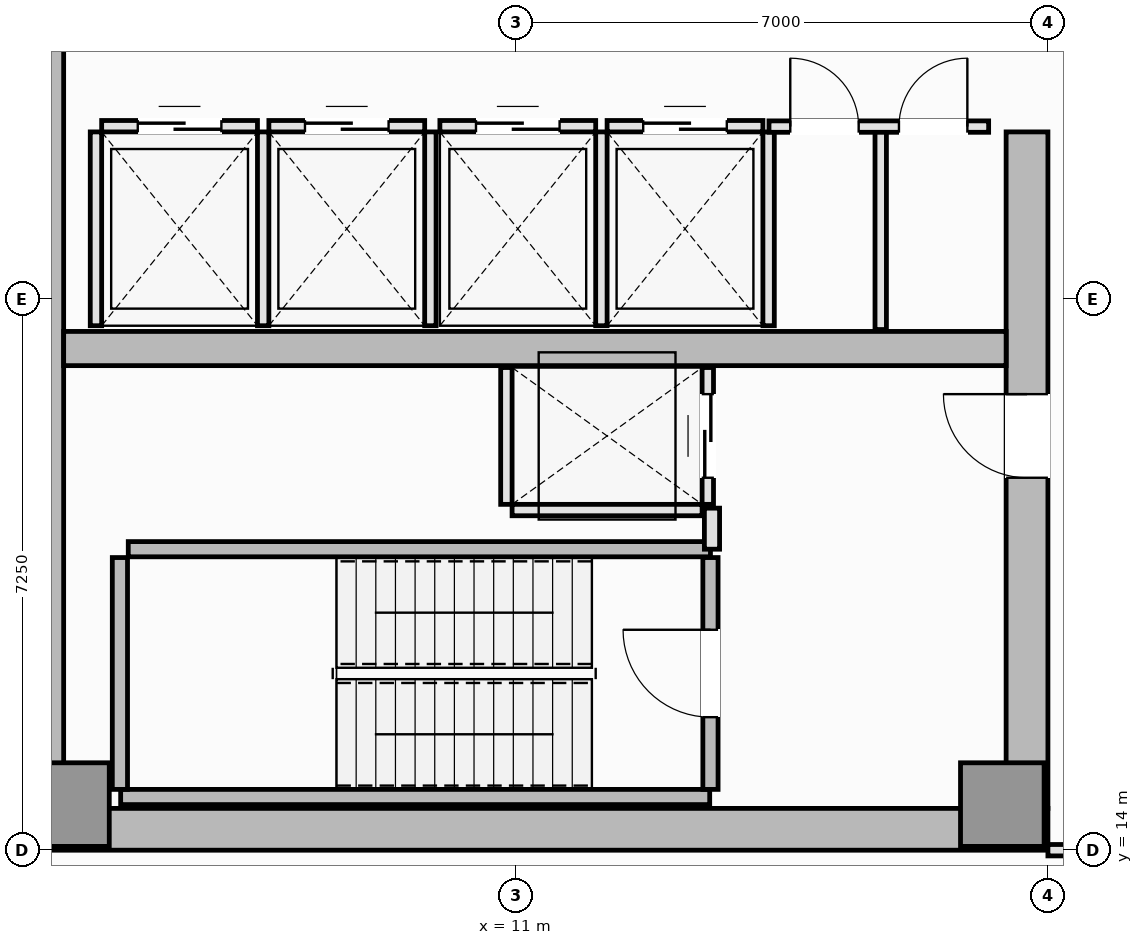
"""IFC4 building model, lengths in metres.
Left out: names, types, materials, properties, quantities, classifications, styles, units other than length and angle.
Written with IfcOpenShell. Run it as: python <this file> out.ifc"""

import sys

from ifc_helpers import new_model, si_unit, direction, frame, frame_2d, origin, origin_2d, place, context, subcontext, project, spatial, rectangle, extrude, element, fill, save


model = new_model("IFC4")
c1 = context("Model", 3, precision=1e-05, world=origin(), true_north=direction((0.0, 1.0)))
c2 = subcontext(c1, "Body", "Model", "MODEL_VIEW")
j1 = project(units=[si_unit("LENGTHUNIT", "METRE"), si_unit("PLANEANGLEUNIT", "RADIAN")], contexts=[c1])
p1 = place(None, origin())
s1 = spatial("IfcSite", under=j1, at=p1, CompositionType="ELEMENT")
p2 = place(p1, origin())
s2 = spatial("IfcBuilding", under=s1, at=p2, CompositionType="ELEMENT")
p3 = place(p2, frame((0.0, 0.0, 183.65)))
s3 = spatial("IfcBuildingStorey", under=s2, at=p3, CompositionType="ELEMENT", Elevation=183.65)
p4 = place(p3, frame((4.5, 14.275, 0.0), z_axis=(0.0, 0.0, 1.0), x_axis=(1.0, 0.0, 0.0)))
e1 = element("IfcWall", 1, at=p4, inside=s3, PredefinedType="SHEAR", context=c2, shape_type="SweptSolid", body=[
    extrude(rectangle(XDim=13.5, YDim=0.55, at=frame_2d((6.75, 0.0))), origin(), (0.0, 0.0, 1.0), 4.4),
])
p5 = place(p3, frame((4.775, 14.55, 0.0), z_axis=(0.0, 0.0, 1.0), x_axis=(0.0, 1.0, 0.0)))
e2 = element("IfcWall", 2, at=p5, inside=s3, PredefinedType="SHEAR", context=c2, shape_type="SweptSolid", body=[
    extrude(rectangle(XDim=21.4, YDim=0.55, at=frame_2d((10.7, 0.0))), origin(), (0.0, 0.0, 1.0), 4.4),
])
p6 = place(p3, frame((17.725, 14.55, 0.0), z_axis=(0.0, 0.0, 1.0), x_axis=(0.0, 1.0, 0.0)))
e3 = element("IfcWall", 3, at=p6, inside=s3, PredefinedType="SHEAR", context=c2, shape_type="SweptSolid", body=[
    extrude(rectangle(XDim=8.9, YDim=0.55, at=frame_2d((4.45, 0.0))), origin(), (0.0, 0.0, 1.0), 4.4),
])
p7 = place(p6, frame((4.35, 0.0, 0.0)))
e4 = element("IfcOpeningElement", 4, at=p7, cuts=e3, PredefinedType="OPENING", context=c2, shape_type="SweptSolid", body=[
    extrude(rectangle(XDim=1.1, YDim=2.15, at=frame_2d((0.55, 1.075))), frame((0.0, 0.285, 0.0), z_axis=(0.0, -1.0, 0.0), x_axis=(1.0, 0.0, 0.0)), (0.0, 0.0, 1.0), 0.57),
])
p8 = place(p3, frame((5.05, 20.6, 0.0), z_axis=(0.0, 0.0, 1.0), x_axis=(1.0, 0.0, 0.0)))
e5 = element("IfcWall", 5, at=p8, inside=s3, PredefinedType="SHEAR", context=c2, shape_type="SweptSolid", body=[
    extrude(rectangle(XDim=12.4, YDim=0.45, at=frame_2d((6.2, 0.0))), origin(), (0.0, 0.0, 1.0), 4.4),
])
for number, where, z_axis, x_axis in (
    (6, (5.1, 14.6, 0.0), (0.0, 0.0, 1.0), (1.0, 0.0, 0.0)),
    (7, (17.4, 14.6, 0.0), (0.0, 0.0, 1.0), (1.0, 0.0, 0.0)),
):
    element("IfcColumn", number, at=place(p3, frame(where, z_axis=z_axis, x_axis=x_axis)), inside=s3, PredefinedType="PILASTER", context=c2, shape_type="SweptSolid", body=[
        extrude(rectangle(XDim=1.1, YDim=1.1, at=origin_2d()), origin(), (0.0, 0.0, 1.0), 4.4),
    ])
p9 = place(p3, frame((5.8, 14.7, 0.0), z_axis=(0.0, 0.0, 1.0), x_axis=(1.0, 0.0, 0.0)))
e8 = element("IfcWall", 8, at=p9, inside=s3, PredefinedType="SOLIDWALL", context=c2, shape_type="SweptSolid", body=[
    extrude(rectangle(XDim=7.75, YDim=0.2, at=frame_2d((3.875, 0.0))), origin(), (0.0, 0.0, 1.0), 4.4),
])
p10 = place(p3, frame((5.79, 14.8, 0.0), z_axis=(0.0, 0.0, 1.0), x_axis=(0.0, 1.0, 0.0)))
e9 = element("IfcWall", 9, at=p10, inside=s3, PredefinedType="SOLIDWALL", context=c2, shape_type="SweptSolid", body=[
    extrude(rectangle(XDim=3.05, YDim=0.2, at=frame_2d((1.525, 0.0))), origin(), (0.0, 0.0, 1.0), 4.4),
])
p11 = place(p3, frame((5.9, 17.96, 0.0), z_axis=(0.0, 0.0, 1.0), x_axis=(1.0, 0.0, 0.0)))
e10 = element("IfcWall", 10, at=p11, inside=s3, PredefinedType="SOLIDWALL", context=c2, shape_type="SweptSolid", body=[
    extrude(rectangle(XDim=7.66, YDim=0.2, at=frame_2d((3.83, 0.0))), origin(), (0.0, 0.0, 1.0), 4.4),
])
p12 = place(p3, frame((13.56, 14.8, 0.0), z_axis=(0.0, 0.0, 1.0), x_axis=(0.0, 1.0, 0.0)))
e11 = element("IfcWall", 11, at=p12, inside=s3, PredefinedType="SOLIDWALL", context=c2, shape_type="SweptSolid", body=[
    extrude(rectangle(XDim=3.05, YDim=0.2, at=frame_2d((1.525, 0.0))), origin(), (0.0, 0.0, 1.0), 4.4),
])
p13 = place(p12, frame((0.95, 0.0, 0.0)))
e12 = element("IfcOpeningElement", 12, at=p13, cuts=e11, PredefinedType="OPENING", context=c2, shape_type="SweptSolid", body=[
    extrude(rectangle(XDim=1.15, YDim=2.15, at=frame_2d((0.575, 1.075))), frame((0.0, 0.11, 0.0), z_axis=(0.0, -1.0, 0.0), x_axis=(1.0, 0.0, 0.0)), (0.0, 0.0, 1.0), 0.22),
])
p14 = place(p3, frame((5.55, 23.525, 0.0), z_axis=(0.0, 0.0, 1.0), x_axis=(1.0, 0.0, 0.0)))
e13 = element("IfcWall", 13, at=p14, inside=s3, PredefinedType="PARTITIONING", context=c2, shape_type="SweptSolid", body=[
    extrude(rectangle(XDim=2.05, YDim=0.15, at=frame_2d((1.025, 0.0))), origin(), (0.0, 0.0, 1.0), 4.22),
])
p15 = place(p14, frame((0.475, 0.0, 0.0)))
e14 = element("IfcOpeningElement", 14, at=p15, cuts=e13, PredefinedType="OPENING", context=c2, shape_type="SweptSolid", body=[
    extrude(rectangle(XDim=1.1, YDim=2.2, at=frame_2d((0.55, 1.1))), frame((0.0, 0.085, 0.0), z_axis=(0.0, -1.0, 0.0), x_axis=(1.0, 0.0, 0.0)), (0.0, 0.0, 1.0), 0.17),
])
for number, where, z_axis, x_axis in (
    (15, (5.475, 20.9, 0.0), (0.0, 0.0, 1.0), (0.0, 1.0, 0.0)),
    (16, (7.675, 20.9, 0.0), (0.0, 0.0, 1.0), (0.0, 1.0, 0.0)),
):
    element("IfcWall", number, at=place(p3, frame(where, z_axis=z_axis, x_axis=x_axis)), inside=s3, PredefinedType="PARTITIONING", context=c2, shape_type="SweptSolid", body=[
        extrude(rectangle(XDim=2.55, YDim=0.15, at=frame_2d((1.275, 0.0))), origin(), (0.0, 0.0, 1.0), 4.22),
    ])
p16 = place(p3, frame((7.75, 23.525, 0.0), z_axis=(0.0, 0.0, 1.0), x_axis=(1.0, 0.0, 0.0)))
e17 = element("IfcWall", 17, at=p16, inside=s3, PredefinedType="PARTITIONING", context=c2, shape_type="SweptSolid", body=[
    extrude(rectangle(XDim=2.05, YDim=0.15, at=frame_2d((1.025, 0.0))), origin(), (0.0, 0.0, 1.0), 4.22),
])
p17 = place(p16, frame((0.475, 0.0, 0.0)))
e18 = element("IfcOpeningElement", 18, at=p17, cuts=e17, PredefinedType="OPENING", context=c2, shape_type="SweptSolid", body=[
    extrude(rectangle(XDim=1.1, YDim=2.2, at=frame_2d((0.55, 1.1))), frame((0.0, 0.085, 0.0), z_axis=(0.0, -1.0, 0.0), x_axis=(1.0, 0.0, 0.0)), (0.0, 0.0, 1.0), 0.17),
])
p18 = place(p3, frame((9.875, 20.9, 0.0), z_axis=(0.0, 0.0, 1.0), x_axis=(0.0, 1.0, 0.0)))
e19 = element("IfcWall", 19, at=p18, inside=s3, PredefinedType="PARTITIONING", context=c2, shape_type="SweptSolid", body=[
    extrude(rectangle(XDim=2.55, YDim=0.15, at=frame_2d((1.275, 0.0))), origin(), (0.0, 0.0, 1.0), 4.22),
])
p19 = place(p3, frame((10.0, 23.525, 0.0), z_axis=(0.0, 0.0, 1.0), x_axis=(1.0, 0.0, 0.0)))
e20 = element("IfcWall", 20, at=p19, inside=s3, PredefinedType="PARTITIONING", context=c2, shape_type="SweptSolid", body=[
    extrude(rectangle(XDim=2.05, YDim=0.15, at=frame_2d((1.025, 0.0))), origin(), (0.0, 0.0, 1.0), 4.22),
])
p20 = place(p19, frame((0.475, 0.0, 0.0)))
e21 = element("IfcOpeningElement", 21, at=p20, cuts=e20, PredefinedType="OPENING", context=c2, shape_type="SweptSolid", body=[
    extrude(rectangle(XDim=1.1, YDim=2.2, at=frame_2d((0.55, 1.1))), frame((0.0, 0.085, 0.0), z_axis=(0.0, -1.0, 0.0), x_axis=(1.0, 0.0, 0.0)), (0.0, 0.0, 1.0), 0.17),
])
p21 = place(p3, frame((12.125, 20.9, 0.0), z_axis=(0.0, 0.0, 1.0), x_axis=(0.0, 1.0, 0.0)))
e22 = element("IfcWall", 22, at=p21, inside=s3, PredefinedType="PARTITIONING", context=c2, shape_type="SweptSolid", body=[
    extrude(rectangle(XDim=2.55, YDim=0.15, at=frame_2d((1.275, 0.0))), origin(), (0.0, 0.0, 1.0), 4.22),
])
p22 = place(p3, frame((12.2, 23.525, 0.0), z_axis=(0.0, 0.0, 1.0), x_axis=(1.0, 0.0, 0.0)))
e23 = element("IfcWall", 23, at=p22, inside=s3, PredefinedType="PARTITIONING", context=c2, shape_type="SweptSolid", body=[
    extrude(rectangle(XDim=2.05, YDim=0.15, at=frame_2d((1.025, 0.0))), origin(), (0.0, 0.0, 1.0), 4.22),
])
p23 = place(p22, frame((0.475, 0.0, 0.0)))
e24 = element("IfcOpeningElement", 24, at=p23, cuts=e23, PredefinedType="OPENING", context=c2, shape_type="SweptSolid", body=[
    extrude(rectangle(XDim=1.1, YDim=2.2, at=frame_2d((0.55, 1.1))), frame((0.0, 0.085, 0.0), z_axis=(0.0, -1.0, 0.0), x_axis=(1.0, 0.0, 0.0)), (0.0, 0.0, 1.0), 0.17),
])
p24 = place(p3, frame((14.325, 20.9, 0.0), z_axis=(0.0, 0.0, 1.0), x_axis=(0.0, 1.0, 0.0)))
e25 = element("IfcWall", 25, at=p24, inside=s3, PredefinedType="PARTITIONING", context=c2, shape_type="SweptSolid", body=[
    extrude(rectangle(XDim=2.55, YDim=0.15, at=frame_2d((1.275, 0.0))), origin(), (0.0, 0.0, 1.0), 4.22),
])
p25 = place(p3, frame((10.95, 18.475, 0.0), z_axis=(0.0, 0.0, 1.0), x_axis=(1.0, 0.0, 0.0)))
e26 = element("IfcWall", 26, at=p25, inside=s3, PredefinedType="PARTITIONING", context=c2, shape_type="SweptSolid", body=[
    extrude(rectangle(XDim=2.5, YDim=0.15, at=frame_2d((1.25, 0.0))), origin(), (0.0, 0.0, 1.0), 4.22),
])
p26 = place(p3, frame((10.875, 18.55, 0.0), z_axis=(0.0, 0.0, 1.0), x_axis=(0.0, 1.0, 0.0)))
e27 = element("IfcWall", 27, at=p26, inside=s3, PredefinedType="PARTITIONING", context=c2, shape_type="SweptSolid", body=[
    extrude(rectangle(XDim=1.8, YDim=0.15, at=frame_2d((0.9, 0.0))), origin(), (0.0, 0.0, 1.0), 4.22),
])
p27 = place(p3, frame((13.525, 18.55, 0.0), z_axis=(0.0, 0.0, 1.0), x_axis=(0.0, 1.0, 0.0)))
e28 = element("IfcWall", 28, at=p27, inside=s3, PredefinedType="PARTITIONING", context=c2, shape_type="SweptSolid", body=[
    extrude(rectangle(XDim=1.8, YDim=0.15, at=frame_2d((0.9, 0.0))), origin(), (0.0, 0.0, 1.0), 4.22),
])
p28 = place(p27, frame((0.35, 0.0, 0.0)))
e29 = element("IfcOpeningElement", 29, at=p28, cuts=e28, PredefinedType="OPENING", context=c2, shape_type="SweptSolid", body=[
    extrude(rectangle(XDim=1.1, YDim=2.2, at=frame_2d((0.55, 1.1))), frame((0.0, 0.085, 0.0), z_axis=(0.0, -1.0, 0.0), x_axis=(1.0, 0.0, 0.0)), (0.0, 0.0, 1.0), 0.17),
])
p29 = place(p3, frame((13.58, 17.96, 0.0), z_axis=(0.0, 0.0, 1.0), x_axis=(0.0, 1.0, 0.0)))
e30 = element("IfcWall", 30, at=p29, inside=s3, PredefinedType="PARTITIONING", context=c2, shape_type="SweptSolid", body=[
    extrude(rectangle(XDim=0.54, YDim=0.2, at=frame_2d((0.27, 0.0))), origin(), (0.0, 0.0, 1.0), 4.22),
])
p30 = place(p3, frame((15.8, 20.85, 0.0), z_axis=(0.0, 0.0, 1.0), x_axis=(0.0, 1.0, 0.0)))
e31 = element("IfcWall", 31, at=p30, inside=s3, PredefinedType="PARTITIONING", context=c2, shape_type="SweptSolid", body=[
    extrude(rectangle(XDim=2.67, YDim=0.15, at=frame_2d((1.335, 0.0))), origin(), (0.0, 0.0, 1.0), 4.22),
])
p31 = place(p3, frame((14.33, 23.52, 0.0), z_axis=(0.0, 0.0, 1.0), x_axis=(1.0, 0.0, 0.0)))
e32 = element("IfcWall", 32, at=p31, inside=s3, PredefinedType="PARTITIONING", context=c2, shape_type="SweptSolid", body=[
    extrude(rectangle(XDim=2.89, YDim=0.15, at=frame_2d((1.445, 0.0))), origin(), (0.0, 0.0, 1.0), 4.22),
])
p32 = place(p31, frame((0.28, 0.0, 0.0)))
e33 = element("IfcOpeningElement", 33, at=p32, cuts=e32, PredefinedType="OPENING", context=c2, shape_type="SweptSolid", body=[
    extrude(rectangle(XDim=0.9, YDim=2.1, at=frame_2d((0.45, 1.05))), frame((0.0, 0.085, 0.0), z_axis=(0.0, -1.0, 0.0), x_axis=(1.0, 0.0, 0.0)), (0.0, 0.0, 1.0), 0.17),
])
p33 = place(p31, frame((1.71, 0.0, 0.0)))
e34 = element("IfcOpeningElement", 34, at=p33, cuts=e32, PredefinedType="OPENING", context=c2, shape_type="SweptSolid", body=[
    extrude(rectangle(XDim=0.9, YDim=2.1, at=frame_2d((0.45, 1.05))), frame((0.0, 0.085, 0.0), z_axis=(0.0, -1.0, 0.0), x_axis=(1.0, 0.0, 0.0)), (0.0, 0.0, 1.0), 0.17),
])
p34 = place(p3, frame((18.0, 14.0, 0.0), z_axis=(0.0, 0.0, 1.0), x_axis=(1.0, 0.0, 0.0)))
e35 = element("IfcWall", 35, at=p34, inside=s3, PredefinedType="PARTITIONING", context=c2, shape_type="SweptSolid", body=[
    extrude(rectangle(XDim=2.2, YDim=0.15, at=frame_2d((1.1, 0.0))), origin(), (0.0, 0.0, 1.0), 4.22),
])
p35 = place(p34, frame((0.65, 0.0, 0.0)))
e36 = element("IfcOpeningElement", 36, at=p35, cuts=e35, PredefinedType="OPENING", context=c2, shape_type="SweptSolid", body=[
    extrude(rectangle(XDim=0.9, YDim=2.1, at=frame_2d((0.45, 1.05))), frame((0.0, 0.085, 0.0), z_axis=(0.0, -1.0, 0.0), x_axis=(1.0, 0.0, 0.0)), (0.0, 0.0, 1.0), 0.17),
])
p36 = place(p13, origin())
e37 = element("IfcDoor", 37, at=p36, inside=s3, OperationType="SINGLE_SWING_RIGHT", PredefinedType="DOOR", context=c2, shape_type="SweptSolid", body=[
    extrude(rectangle(XDim=1.15, YDim=2.15, at=frame_2d((0.575, 1.075))), frame((0.0, 0.025, 0.0), z_axis=(0.0, -1.0, 0.0), x_axis=(1.0, 0.0, 0.0)), (0.0, 0.0, 1.0), 0.05),
])
fill(e12, e37)
p37 = place(p15, origin())
e38 = element("IfcDoor", 38, at=p37, inside=s3, OperationType="DOUBLE_DOOR_SLIDING", PredefinedType="DOOR", context=c2, shape_type="SweptSolid", body=[
    extrude(rectangle(XDim=1.1, YDim=2.2, at=frame_2d((0.55, 1.1))), frame((0.0, 0.025, 0.0), z_axis=(0.0, -1.0, 0.0), x_axis=(1.0, 0.0, 0.0)), (0.0, 0.0, 1.0), 0.05),
])
fill(e14, e38)
p38 = place(p17, origin())
e39 = element("IfcDoor", 39, at=p38, inside=s3, OperationType="DOUBLE_DOOR_SLIDING", PredefinedType="DOOR", context=c2, shape_type="SweptSolid", body=[
    extrude(rectangle(XDim=1.1, YDim=2.2, at=frame_2d((0.55, 1.1))), frame((0.0, 0.025, 0.0), z_axis=(0.0, -1.0, 0.0), x_axis=(1.0, 0.0, 0.0)), (0.0, 0.0, 1.0), 0.05),
])
fill(e18, e39)
p39 = place(p20, origin())
e40 = element("IfcDoor", 40, at=p39, inside=s3, OperationType="DOUBLE_DOOR_SLIDING", PredefinedType="DOOR", context=c2, shape_type="SweptSolid", body=[
    extrude(rectangle(XDim=1.1, YDim=2.2, at=frame_2d((0.55, 1.1))), frame((0.0, 0.025, 0.0), z_axis=(0.0, -1.0, 0.0), x_axis=(1.0, 0.0, 0.0)), (0.0, 0.0, 1.0), 0.05),
])
fill(e21, e40)
p40 = place(p23, origin())
e41 = element("IfcDoor", 41, at=p40, inside=s3, OperationType="DOUBLE_DOOR_SLIDING", PredefinedType="DOOR", context=c2, shape_type="SweptSolid", body=[
    extrude(rectangle(XDim=1.1, YDim=2.2, at=frame_2d((0.55, 1.1))), frame((0.0, 0.025, 0.0), z_axis=(0.0, -1.0, 0.0), x_axis=(1.0, 0.0, 0.0)), (0.0, 0.0, 1.0), 0.05),
])
fill(e24, e41)
p41 = place(p28, origin())
e42 = element("IfcDoor", 42, at=p41, inside=s3, OperationType="DOUBLE_DOOR_SLIDING", PredefinedType="DOOR", context=c2, shape_type="SweptSolid", body=[
    extrude(rectangle(XDim=1.1, YDim=2.2, at=frame_2d((0.55, 1.1))), frame((0.0, 0.025, 0.0), z_axis=(0.0, -1.0, 0.0), x_axis=(1.0, 0.0, 0.0)), (0.0, 0.0, 1.0), 0.05),
])
fill(e29, e42)
p42 = place(p7, origin())
e43 = element("IfcDoor", 43, at=p42, inside=s3, OperationType="SINGLE_SWING_RIGHT", PredefinedType="DOOR", context=c2, shape_type="SweptSolid", body=[
    extrude(rectangle(XDim=1.1, YDim=2.15, at=frame_2d((0.55, 1.075))), frame((0.0, 0.025, 0.0), z_axis=(0.0, -1.0, 0.0), x_axis=(1.0, 0.0, 0.0)), (0.0, 0.0, 1.0), 0.05),
])
fill(e4, e43)
p43 = place(p32, origin())
e44 = element("IfcDoor", 44, at=p43, inside=s3, OperationType="SINGLE_SWING_LEFT", PredefinedType="DOOR", context=c2, shape_type="SweptSolid", body=[
    extrude(rectangle(XDim=0.9, YDim=2.1, at=frame_2d((0.45, 1.05))), frame((0.0, 0.025, 0.0), z_axis=(0.0, -1.0, 0.0), x_axis=(1.0, 0.0, 0.0)), (0.0, 0.0, 1.0), 0.05),
])
fill(e33, e44)
p44 = place(p33, origin())
e45 = element("IfcDoor", 45, at=p44, inside=s3, OperationType="SINGLE_SWING_RIGHT", PredefinedType="DOOR", context=c2, shape_type="SweptSolid", body=[
    extrude(rectangle(XDim=0.9, YDim=2.1, at=frame_2d((0.45, 1.05))), frame((0.0, 0.025, 0.0), z_axis=(0.0, -1.0, 0.0), x_axis=(1.0, 0.0, 0.0)), (0.0, 0.0, 1.0), 0.05),
])
fill(e34, e45)
save(model, sys.argv[1])
